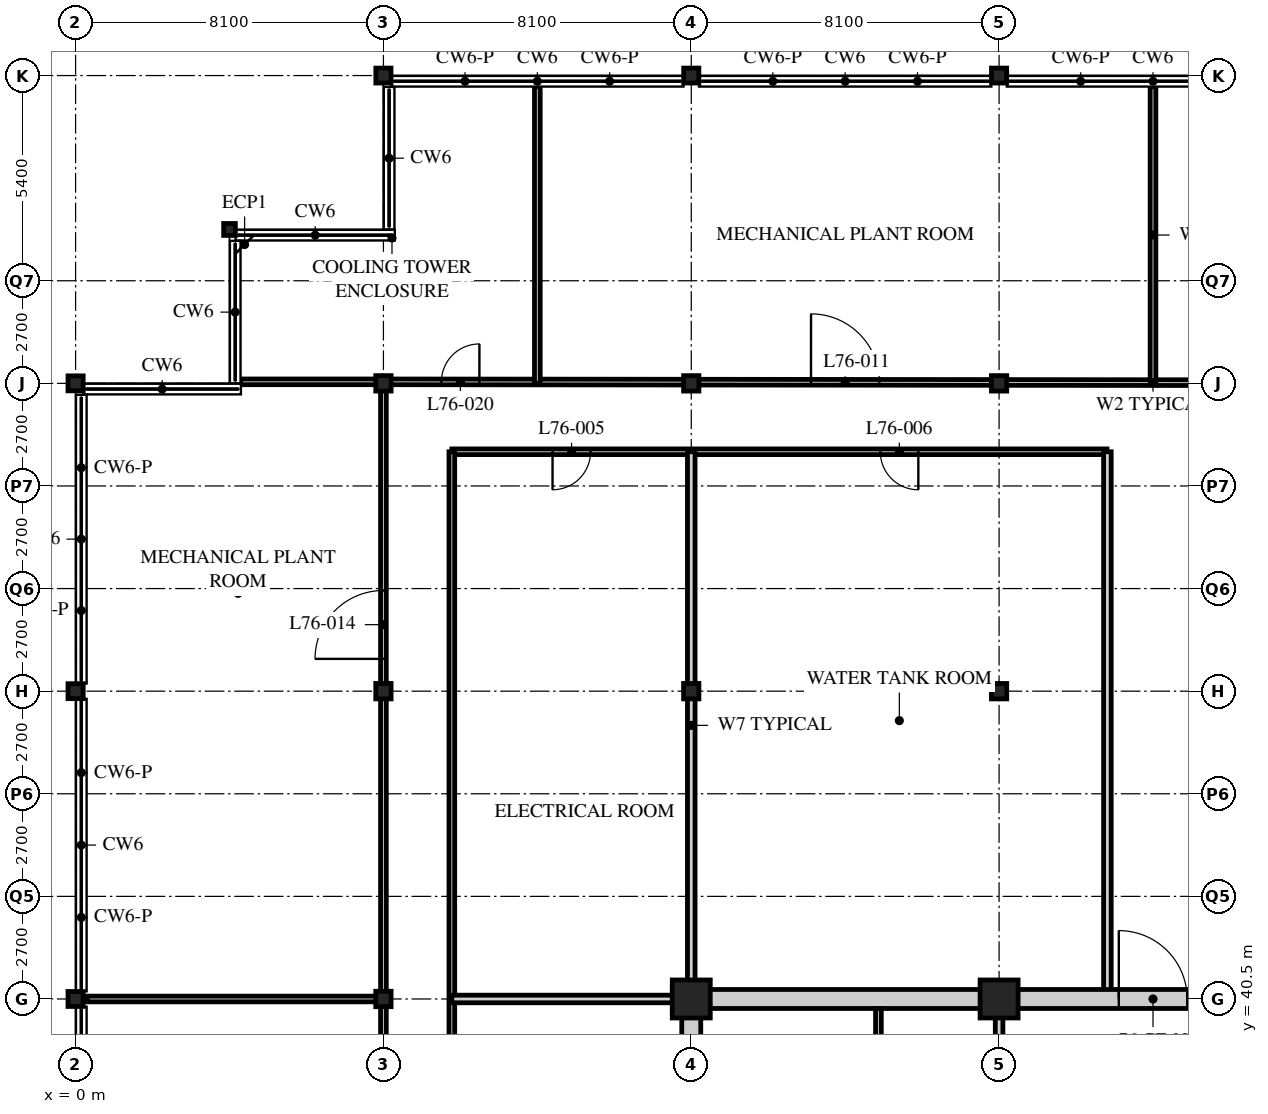
"""IFC4 building model, lengths in metres.
Left out: names, types, materials, properties, quantities, classifications, styles, units other than length and angle.
Written with IfcOpenShell. Run it as: python <this file> out.ifc"""

import sys

from ifc_helpers import new_model, si_unit, direction, frame, frame_2d, origin, origin_2d, place, context, subcontext, project, spatial, rectangle, hollow_rectangle, i_section, extrude, element, fill, save


model = new_model("IFC4")
c1 = context("Model", 3, precision=1e-05, world=origin(), true_north=direction((0.0, 1.0)))
c2 = subcontext(c1, "Body", "Model", "MODEL_VIEW")
j1 = project(units=[si_unit("LENGTHUNIT", "METRE"), si_unit("PLANEANGLEUNIT", "RADIAN")], contexts=[c1])
p1 = place(None, origin())
s1 = spatial("IfcSite", under=j1, at=p1, CompositionType="ELEMENT")
p2 = place(p1, origin())
s2 = spatial("IfcBuilding", under=s1, at=p2, CompositionType="ELEMENT")
p3 = place(p2, frame((0.0, 0.0, 298.5)))
s3 = spatial("IfcBuildingStorey", under=s2, at=p3, CompositionType="ELEMENT", Elevation=298.5)
for number, where, z_axis, x_axis in (
    (1, (0.0, 40.5, 0.0), (0.0, 0.0, 1.0), (1.0, 0.0, 0.0)),
    (2, (0.0, 48.6, 0.0), (0.0, 0.0, 1.0), (1.0, 0.0, 0.0)),
    (3, (0.0, 56.7, 0.0), (0.0, 0.0, 1.0), (1.0, 0.0, 0.0)),
):
    element("IfcColumn", number, at=place(p3, frame(where, z_axis=z_axis, x_axis=x_axis)), inside=s3, PredefinedType="COLUMN", context=c2, shape_type="SweptSolid", body=[
        extrude(i_section(OverallWidth=0.399, OverallDepth=0.394, WebThickness=0.023, FlangeThickness=0.037, FilletRadius=0.015, at=origin_2d()), origin(), (0.0, 0.0, 1.0), 5.4),
    ])
p4 = place(p3, frame((4.05, 60.75, 0.0), z_axis=(0.0, 0.0, 1.0), x_axis=(1.0, 0.0, 0.0)))
e4 = element("IfcColumn", 4, at=p4, inside=s3, PredefinedType="COLUMN", context=c2, shape_type="SweptSolid", body=[
    extrude(i_section(OverallWidth=0.307, OverallDepth=0.314, WebThickness=0.012, FlangeThickness=0.019, FilletRadius=0.015, at=origin_2d()), origin(), (0.0, 0.0, 1.0), 5.4),
])
for number, where, z_axis, x_axis in (
    (5, (8.1, 40.5, 0.0), (0.0, 0.0, 1.0), (1.0, 0.0, 0.0)),
    (6, (8.1, 48.6, 0.0), (0.0, 0.0, 1.0), (1.0, 0.0, 0.0)),
    (7, (8.1, 56.7, 0.0), (0.0, 0.0, 1.0), (1.0, 0.0, 0.0)),
):
    element("IfcColumn", number, at=place(p3, frame(where, z_axis=z_axis, x_axis=x_axis)), inside=s3, PredefinedType="COLUMN", context=c2, shape_type="SweptSolid", body=[
        extrude(i_section(OverallWidth=0.403, OverallDepth=0.406, WebThickness=0.027, FlangeThickness=0.043, FilletRadius=0.015, at=origin_2d()), origin(), (0.0, 0.0, 1.0), 5.4),
    ])
p5 = place(p3, frame((8.1, 64.8, 0.0), z_axis=(0.0, 0.0, 1.0), x_axis=(1.0, 0.0, 0.0)))
e8 = element("IfcColumn", 8, at=p5, inside=s3, PredefinedType="COLUMN", context=c2, shape_type="SweptSolid", body=[
    extrude(i_section(OverallWidth=0.399, OverallDepth=0.394, WebThickness=0.023, FlangeThickness=0.037, FilletRadius=0.015, at=origin_2d()), origin(), (0.0, 0.0, 1.0), 5.4),
])
p6 = place(p3, frame((16.2, 40.5, 0.0), z_axis=(0.0, 0.0, 1.0), x_axis=(1.0, 0.0, 0.0)))
e9 = element("IfcColumn", 9, at=p6, inside=s3, PredefinedType="COLUMN", context=c2, shape_type="SweptSolid", body=[
    extrude(hollow_rectangle(XDim=1.0, YDim=1.0, WallThickness=0.1, at=origin_2d()), origin(), (0.0, 0.0, 1.0), 5.4),
])
for number, where, z_axis, x_axis in (
    (10, (16.2, 48.6, 0.0), (0.0, 0.0, 1.0), (1.0, 0.0, 0.0)),
    (11, (16.2, 56.7, 0.0), (0.0, 0.0, 1.0), (1.0, 0.0, 0.0)),
):
    element("IfcColumn", number, at=place(p3, frame(where, z_axis=z_axis, x_axis=x_axis)), inside=s3, PredefinedType="COLUMN", context=c2, shape_type="SweptSolid", body=[
        extrude(i_section(OverallWidth=0.403, OverallDepth=0.406, WebThickness=0.027, FlangeThickness=0.043, FilletRadius=0.015, at=origin_2d()), origin(), (0.0, 0.0, 1.0), 5.4),
    ])
p7 = place(p3, frame((16.2, 64.8, 0.0), z_axis=(0.0, 0.0, 1.0), x_axis=(1.0, 0.0, 0.0)))
e12 = element("IfcColumn", 12, at=p7, inside=s3, PredefinedType="COLUMN", context=c2, shape_type="SweptSolid", body=[
    extrude(i_section(OverallWidth=0.399, OverallDepth=0.394, WebThickness=0.023, FlangeThickness=0.037, FilletRadius=0.015, at=origin_2d()), origin(), (0.0, 0.0, 1.0), 5.4),
])
p8 = place(p3, frame((24.3, 40.5, 0.0), z_axis=(0.0, 0.0, 1.0), x_axis=(1.0, 0.0, 0.0)))
e13 = element("IfcColumn", 13, at=p8, inside=s3, PredefinedType="COLUMN", context=c2, shape_type="SweptSolid", body=[
    extrude(hollow_rectangle(XDim=1.0, YDim=1.0, WallThickness=0.1, at=origin_2d()), origin(), (0.0, 0.0, 1.0), 5.4),
])
for number, where, z_axis, x_axis in (
    (14, (24.3, 48.6, 0.0), (0.0, 0.0, 1.0), (1.0, 0.0, 0.0)),
    (15, (24.3, 56.7, 0.0), (0.0, 0.0, 1.0), (1.0, 0.0, 0.0)),
):
    element("IfcColumn", number, at=place(p3, frame(where, z_axis=z_axis, x_axis=x_axis)), inside=s3, PredefinedType="COLUMN", context=c2, shape_type="SweptSolid", body=[
        extrude(i_section(OverallWidth=0.403, OverallDepth=0.406, WebThickness=0.027, FlangeThickness=0.043, FilletRadius=0.015, at=origin_2d()), origin(), (0.0, 0.0, 1.0), 5.4),
    ])
p9 = place(p3, frame((24.3, 64.8, 0.0), z_axis=(0.0, 0.0, 1.0), x_axis=(1.0, 0.0, 0.0)))
e16 = element("IfcColumn", 16, at=p9, inside=s3, PredefinedType="COLUMN", context=c2, shape_type="SweptSolid", body=[
    extrude(i_section(OverallWidth=0.399, OverallDepth=0.394, WebThickness=0.023, FlangeThickness=0.037, FilletRadius=0.015, at=origin_2d()), origin(), (0.0, 0.0, 1.0), 5.4),
])
p10 = place(p3, frame((8.1, 56.74, 0.0), z_axis=(0.0, 0.0, 1.0), x_axis=(0.999999511317, -0.000988618344, 0.0)))
e17 = element("IfcWall", 17, at=p10, inside=s3, PredefinedType="PARTITIONING", context=c2, shape_type="SweptSolid", body=[
    extrude(rectangle(XDim=40.5, YDim=0.15, at=frame_2d((20.25, 0.0))), origin(), (0.0, 0.0, 1.0), 4.428),
])
p11 = place(p10, frame((11.25, 0.0, 0.0)))
e18 = element("IfcOpeningElement", 18, at=p11, cuts=e17, PredefinedType="OPENING", context=c2, shape_type="SweptSolid", body=[
    extrude(rectangle(XDim=1.8, YDim=2.4, at=frame_2d((0.9, 1.2))), frame((0.0, 0.085, 0.0), z_axis=(0.0, -1.0, 0.0), x_axis=(1.0, 0.0, 0.0)), (0.0, 0.0, 1.0), 0.17),
])
p12 = place(p10, frame((27.45, 0.0, 0.0)))
e19 = element("IfcOpeningElement", 19, at=p12, cuts=e17, PredefinedType="OPENING", context=c2, shape_type="SweptSolid", body=[
    extrude(rectangle(XDim=1.8, YDim=2.4, at=frame_2d((0.9, 1.2))), frame((0.0, 0.085, 0.0), z_axis=(0.0, -1.0, 0.0), x_axis=(1.0, 0.0, 0.0)), (0.0, 0.0, 1.0), 0.17),
])
p13 = place(p10, frame((37.975, 0.0, 0.0)))
e20 = element("IfcOpeningElement", 20, at=p13, cuts=e17, PredefinedType="OPENING", context=c2, shape_type="SweptSolid", body=[
    extrude(rectangle(XDim=1.0, YDim=2.1, at=frame_2d((0.5, 1.05))), frame((0.0, 0.085, 0.0), z_axis=(0.0, -1.0, 0.0), x_axis=(1.0, 0.0, 0.0)), (0.0, 0.0, 1.0), 0.17),
])
p14 = place(p10, frame((1.525, 0.0, 0.0)))
e21 = element("IfcOpeningElement", 21, at=p14, cuts=e17, PredefinedType="OPENING", context=c2, shape_type="SweptSolid", body=[
    extrude(rectangle(XDim=1.0, YDim=2.1, at=frame_2d((0.5, 1.05))), frame((0.0, 0.085, 0.0), z_axis=(0.0, -1.0, 0.0), x_axis=(1.0, 0.0, 0.0)), (0.0, 0.0, 1.0), 0.17),
])
p15 = place(p3, frame((8.1, 22.5, 0.0), z_axis=(0.0, 0.0, 1.0), x_axis=(0.0, 1.0, 0.0)))
e22 = element("IfcWall", 22, at=p15, inside=s3, PredefinedType="PARTITIONING", context=c2, shape_type="SweptSolid", body=[
    extrude(rectangle(XDim=34.24, YDim=0.15, at=frame_2d((17.12, 0.0))), origin(), (0.0, 0.0, 1.0), 4.428),
])
p16 = place(p15, frame((7.1, 0.0, 0.0)))
e23 = element("IfcOpeningElement", 23, at=p16, cuts=e22, PredefinedType="OPENING", context=c2, shape_type="SweptSolid", body=[
    extrude(rectangle(XDim=1.8, YDim=2.4, at=frame_2d((0.9, 1.2))), frame((0.0, 0.085, 0.0), z_axis=(0.0, -1.0, 0.0), x_axis=(1.0, 0.0, 0.0)), (0.0, 0.0, 1.0), 0.17),
])
p17 = place(p15, frame((26.95, 0.0, 0.0)))
e24 = element("IfcOpeningElement", 24, at=p17, cuts=e22, PredefinedType="OPENING", context=c2, shape_type="SweptSolid", body=[
    extrude(rectangle(XDim=1.8, YDim=2.4, at=frame_2d((0.9, 1.2))), frame((0.0, 0.085, 0.0), z_axis=(0.0, -1.0, 0.0), x_axis=(1.0, 0.0, 0.0)), (0.0, 0.0, 1.0), 0.17),
])
p18 = place(p3, frame((27.14, 54.9, 0.0), z_axis=(0.0, 0.0, 1.0), x_axis=(-1.0, 0.0, 0.0)))
e25 = element("IfcWall", 25, at=p18, inside=s3, PredefinedType="PARTITIONING", context=c2, shape_type="SweptSolid", body=[
    extrude(rectangle(XDim=17.24, YDim=0.15, at=frame_2d((8.62, 0.0))), origin(), (0.0, 0.0, 1.0), 5.19),
])
p19 = place(p18, frame((13.59, 0.0, 0.0)))
e26 = element("IfcOpeningElement", 26, at=p19, cuts=e25, PredefinedType="OPENING", context=c2, shape_type="SweptSolid", body=[
    extrude(rectangle(XDim=1.0, YDim=2.1, at=frame_2d((0.5, 1.05))), frame((0.0, 0.085, 0.0), z_axis=(0.0, -1.0, 0.0), x_axis=(1.0, 0.0, 0.0)), (0.0, 0.0, 1.0), 0.17),
])
p20 = place(p18, frame((4.965, 0.0, 0.0)))
e27 = element("IfcOpeningElement", 27, at=p20, cuts=e25, PredefinedType="OPENING", context=c2, shape_type="SweptSolid", body=[
    extrude(rectangle(XDim=1.0, YDim=2.1, at=frame_2d((0.5, 1.05))), frame((0.0, 0.085, 0.0), z_axis=(0.0, -1.0, 0.0), x_axis=(1.0, 0.0, 0.0)), (0.0, 0.0, 1.0), 0.17),
])
p21 = place(p3, frame((9.9, 54.9, 0.0), z_axis=(0.0, 0.0, 1.0), x_axis=(0.0, -1.0, 0.0)))
e28 = element("IfcWall", 28, at=p21, inside=s3, PredefinedType="PARTITIONING", context=c2, shape_type="SweptSolid", body=[
    extrude(rectangle(XDim=30.6, YDim=0.15, at=frame_2d((15.3, 0.0))), origin(), (0.0, 0.0, 1.0), 5.19),
])
p22 = place(p21, frame((26.05, 0.0, 0.0)))
e29 = element("IfcOpeningElement", 29, at=p22, cuts=e28, PredefinedType="OPENING", context=c2, shape_type="SweptSolid", body=[
    extrude(rectangle(XDim=1.0, YDim=2.1, at=frame_2d((0.5, 1.05))), frame((0.0, 0.085, 0.0), z_axis=(0.0, -1.0, 0.0), x_axis=(1.0, 0.0, 0.0)), (0.0, 0.0, 1.0), 0.17),
])
p23 = place(p21, frame((17.95, 0.0, 0.0)))
e30 = element("IfcOpeningElement", 30, at=p23, cuts=e28, PredefinedType="OPENING", context=c2, shape_type="SweptSolid", body=[
    extrude(rectangle(XDim=1.0, YDim=2.1, at=frame_2d((0.5, 1.05))), frame((0.0, 0.085, 0.0), z_axis=(0.0, -1.0, 0.0), x_axis=(1.0, 0.0, 0.0)), (0.0, 0.0, 1.0), 0.17),
])
p24 = place(p3, frame((16.2, 40.5, 0.0), z_axis=(0.0, 0.0, 1.0), x_axis=(0.0, 1.0, 0.0)))
e31 = element("IfcWall", 31, at=p24, inside=s3, PredefinedType="SOLIDWALL", context=c2, shape_type="SweptSolid", body=[
    extrude(rectangle(XDim=14.4, YDim=0.2, at=frame_2d((7.2, 0.0))), origin(), (0.0, 0.0, 1.0), 4.428),
])
p25 = place(p3, frame((27.15, 40.5, 0.0), z_axis=(0.0, 0.0, 1.0), x_axis=(0.0, 1.0, 0.0)))
e32 = element("IfcWall", 32, at=p25, inside=s3, PredefinedType="SOLIDWALL", context=c2, shape_type="SweptSolid", body=[
    extrude(rectangle(XDim=14.4, YDim=0.2, at=frame_2d((7.2, 0.0))), origin(), (0.0, 0.0, 1.0), 5.19),
])
p26 = place(p3, frame((9.9, 40.5, 0.0), z_axis=(0.0, 0.0, 1.0), x_axis=(1.0, 0.0, 0.0)))
e33 = element("IfcWall", 33, at=p26, inside=s3, PredefinedType="SOLIDWALL", context=c2, shape_type="SweptSolid", body=[
    extrude(rectangle(XDim=6.3, YDim=0.2, at=frame_2d((3.15, 0.0))), origin(), (0.0, 0.0, 1.0), 4.428),
])
p27 = place(p3, frame((28.35, 56.7, 0.0), z_axis=(0.0, 0.0, 1.0), x_axis=(0.0, 1.0, 0.0)))
e34 = element("IfcWall", 34, at=p27, inside=s3, PredefinedType="PARTITIONING", context=c2, shape_type="SweptSolid", body=[
    extrude(rectangle(XDim=7.807, YDim=0.15, at=frame_2d((3.904, 0.0))), origin(), (0.0, 0.0, 1.0), 5.19),
])
p28 = place(p3, frame((8.1, 40.5, 0.0), z_axis=(0.0, 0.0, 1.0), x_axis=(-1.0, 0.0, 0.0)))
e35 = element("IfcWall", 35, at=p28, inside=s3, PredefinedType="PARTITIONING", context=c2, shape_type="SweptSolid", body=[
    extrude(rectangle(XDim=7.8, YDim=0.15, at=frame_2d((3.9, 0.0))), origin(), (0.0, 0.0, 1.0), 4.428),
])
p29 = place(p3, frame((4.343, 56.74, 0.0), z_axis=(0.0, 0.0, 1.0), x_axis=(1.0, 0.0, 0.0)))
e36 = element("IfcWall", 36, at=p29, inside=s3, PredefinedType="PARTITIONING", context=c2, shape_type="SweptSolid", body=[
    extrude(rectangle(XDim=3.757, YDim=0.15, at=frame_2d((1.878, 0.0))), origin(), (0.0, 0.0, 1.0), 4.428),
])
p30 = place(p3, frame((12.15, 56.7, 0.0), z_axis=(0.0, 0.0, 1.0), x_axis=(0.0, 1.0, 0.0)))
e37 = element("IfcWall", 37, at=p30, inside=s3, PredefinedType="PARTITIONING", context=c2, shape_type="SweptSolid", body=[
    extrude(rectangle(XDim=7.807, YDim=0.15, at=frame_2d((3.904, 0.0))), origin(), (0.0, 0.0, 1.0), 5.19),
])
p31 = place(p3, frame((15.95, 40.5, 0.0), z_axis=(0.0, 0.0, 1.0), x_axis=(1.0, 0.0, 0.0)))
e38 = element("IfcWall", 38, at=p31, inside=s3, PredefinedType="SOLIDWALL", context=c2, shape_type="SweptSolid", body=[
    extrude(rectangle(XDim=24.8, YDim=0.5, at=frame_2d((12.4, 0.0))), origin(), (0.0, 0.0, 1.0), 4.428),
])
p32 = place(p31, frame((11.5, 0.0, 0.0)))
e39 = element("IfcOpeningElement", 39, at=p32, cuts=e38, PredefinedType="OPENING", context=c2, shape_type="SweptSolid", body=[
    extrude(rectangle(XDim=1.8, YDim=2.4, at=frame_2d((0.9, 1.2))), frame((0.0, 0.26, 0.0), z_axis=(0.0, -1.0, 0.0), x_axis=(1.0, 0.0, 0.0)), (0.0, 0.0, 1.0), 0.52),
])
p33 = place(p3, frame((16.2, 24.55, 0.0), z_axis=(0.0, 0.0, 1.0), x_axis=(0.0, 1.0, 0.0)))
e40 = element("IfcWall", 40, at=p33, inside=s3, PredefinedType="SOLIDWALL", context=c2, shape_type="SweptSolid", body=[
    extrude(rectangle(XDim=15.7, YDim=0.5, at=frame_2d((7.85, 0.0))), origin(), (0.0, 0.0, 1.0), 4.428),
])
p34 = place(p3, frame((24.3, 32.5, 0.0), z_axis=(0.0, 0.0, 1.0), x_axis=(0.0, 1.0, 0.0)))
e41 = element("IfcWall", 41, at=p34, inside=s3, PredefinedType="PARTITIONING", context=c2, shape_type="SweptSolid", body=[
    extrude(rectangle(XDim=7.75, YDim=0.2, at=frame_2d((3.875, 0.0))), origin(), (0.0, 0.0, 1.0), 4.428),
])
p35 = place(p34, frame((1.05, 0.0, 0.0)))
e42 = element("IfcOpeningElement", 42, at=p35, cuts=e41, PredefinedType="OPENING", context=c2, shape_type="SweptSolid", body=[
    extrude(rectangle(XDim=0.9, YDim=2.1, at=frame_2d((0.45, 1.05))), frame((0.0, 0.11, 0.0), z_axis=(0.0, -1.0, 0.0), x_axis=(1.0, 0.0, 0.0)), (0.0, 0.0, 1.0), 0.22),
])
p36 = place(p34, frame((3.45, 0.0, 0.0)))
e43 = element("IfcOpeningElement", 43, at=p36, cuts=e41, PredefinedType="OPENING", context=c2, shape_type="SweptSolid", body=[
    extrude(rectangle(XDim=0.9, YDim=2.1, at=frame_2d((0.45, 1.05))), frame((0.0, 0.11, 0.0), z_axis=(0.0, -1.0, 0.0), x_axis=(1.0, 0.0, 0.0)), (0.0, 0.0, 1.0), 0.22),
])
p37 = place(p34, frame((5.825, 0.0, 0.0)))
e44 = element("IfcOpeningElement", 44, at=p37, cuts=e41, PredefinedType="OPENING", context=c2, shape_type="SweptSolid", body=[
    extrude(rectangle(XDim=0.9, YDim=2.1, at=frame_2d((0.45, 1.05))), frame((0.0, 0.11, 0.0), z_axis=(0.0, -1.0, 0.0), x_axis=(1.0, 0.0, 0.0)), (0.0, 0.0, 1.0), 0.22),
])
p38 = place(p3, frame((21.125, 37.3, 0.0), z_axis=(0.0, 0.0, 1.0), x_axis=(0.0, 1.0, 0.0)))
e45 = element("IfcWall", 45, at=p38, inside=s3, PredefinedType="PARTITIONING", context=c2, shape_type="SweptSolid", body=[
    extrude(rectangle(XDim=2.95, YDim=0.15, at=frame_2d((1.475, 0.0))), origin(), (0.0, 0.0, 1.0), 5.19),
])
p39 = place(p19, origin())
e46 = element("IfcDoor", 46, at=p39, inside=s3, OperationType="SINGLE_SWING_RIGHT", PredefinedType="DOOR", context=c2, shape_type="SweptSolid", body=[
    extrude(rectangle(XDim=1.0, YDim=2.1, at=frame_2d((0.5, 1.05))), frame((0.0, 0.025, 0.0), z_axis=(0.0, -1.0, 0.0), x_axis=(1.0, 0.0, 0.0)), (0.0, 0.0, 1.0), 0.05),
])
fill(e26, e46)
p40 = place(p20, origin())
e47 = element("IfcDoor", 47, at=p40, inside=s3, OperationType="SINGLE_SWING_LEFT", PredefinedType="DOOR", context=c2, shape_type="SweptSolid", body=[
    extrude(rectangle(XDim=1.0, YDim=2.1, at=frame_2d((0.5, 1.05))), frame((0.0, 0.025, 0.0), z_axis=(0.0, -1.0, 0.0), x_axis=(1.0, 0.0, 0.0)), (0.0, 0.0, 1.0), 0.05),
])
fill(e27, e47)
p41 = place(p11, origin())
e48 = element("IfcDoor", 48, at=p41, inside=s3, OperationType="DOUBLE_DOOR_SINGLE_SWING", PredefinedType="DOOR", context=c2, shape_type="SweptSolid", body=[
    extrude(rectangle(XDim=1.8, YDim=2.4, at=frame_2d((0.9, 1.2))), frame((0.0, 0.025, 0.0), z_axis=(0.0, -1.0, 0.0), x_axis=(1.0, 0.0, 0.0)), (0.0, 0.0, 1.0), 0.05),
])
fill(e18, e48)
p42 = place(p17, origin())
e49 = element("IfcDoor", 49, at=p42, inside=s3, OperationType="DOUBLE_DOOR_SINGLE_SWING", PredefinedType="DOOR", context=c2, shape_type="SweptSolid", body=[
    extrude(rectangle(XDim=1.8, YDim=2.4, at=frame_2d((0.9, 1.2))), frame((0.0, 0.025, 0.0), z_axis=(0.0, -1.0, 0.0), x_axis=(1.0, 0.0, 0.0)), (0.0, 0.0, 1.0), 0.05),
])
fill(e24, e49)
p43 = place(p14, origin())
e50 = element("IfcDoor", 50, at=p43, inside=s3, OperationType="SINGLE_SWING_RIGHT", PredefinedType="DOOR", context=c2, shape_type="SweptSolid", body=[
    extrude(rectangle(XDim=1.0, YDim=2.1, at=frame_2d((0.5, 1.05))), frame((0.0, 0.025, 0.0), z_axis=(0.0, -1.0, 0.0), x_axis=(1.0, 0.0, 0.0)), (0.0, 0.0, 1.0), 0.05),
])
fill(e21, e50)
p44 = place(p32, origin())
e51 = element("IfcDoor", 51, at=p44, inside=s3, OperationType="DOUBLE_DOOR_SINGLE_SWING", PredefinedType="DOOR", context=c2, shape_type="SweptSolid", body=[
    extrude(rectangle(XDim=1.8, YDim=2.4, at=frame_2d((0.9, 1.2))), frame((0.0, 0.025, 0.0), z_axis=(0.0, -1.0, 0.0), x_axis=(1.0, 0.0, 0.0)), (0.0, 0.0, 1.0), 0.05),
])
fill(e39, e51)
save(model, sys.argv[1])
